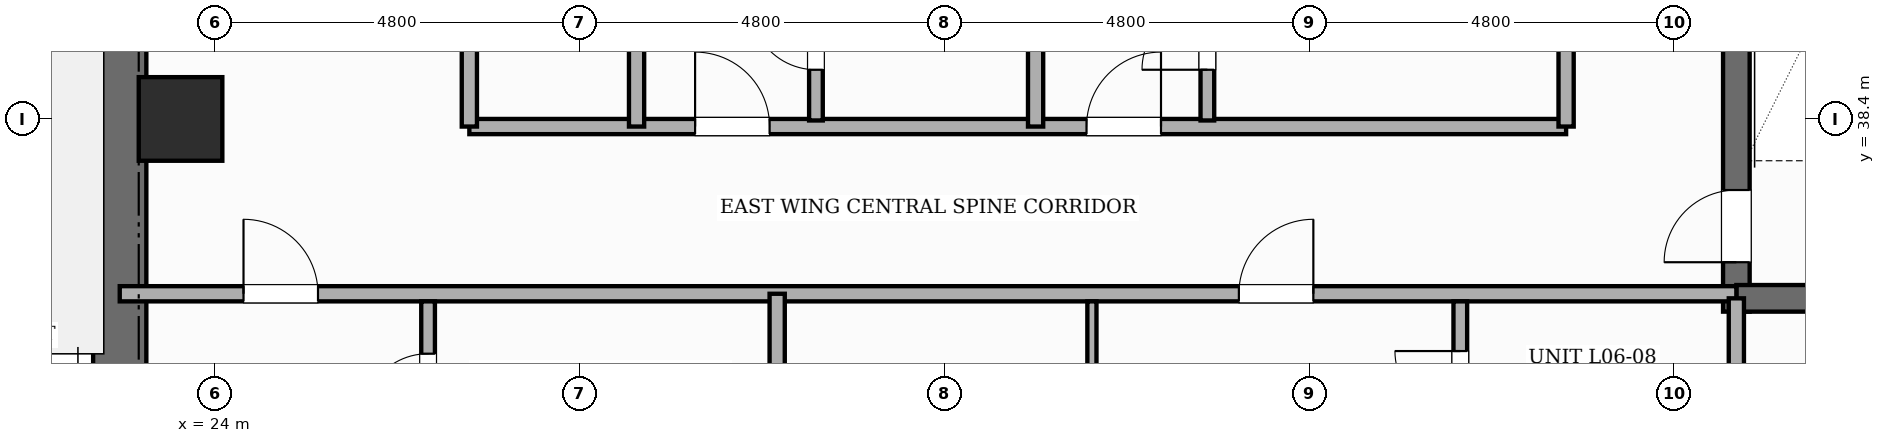
"""IFC4 building model, lengths in metres.
Left out: names, types, materials, properties, quantities, classifications, styles, units other than length and angle.
Written with IfcOpenShell. Run it as: python <this file> out.ifc"""

import sys

from ifc_helpers import new_model, si_unit, direction, frame, frame_2d, origin, origin_2d, place, context, subcontext, project, spatial, rectangle, extrude, element, fill, save


model = new_model("IFC4")
c1 = context("Model", 3, precision=1e-05, world=origin(), true_north=direction((0.0, 1.0)))
c2 = subcontext(c1, "Body", "Model", "MODEL_VIEW")
j1 = project(units=[si_unit("LENGTHUNIT", "METRE"), si_unit("PLANEANGLEUNIT", "RADIAN")], contexts=[c1])
p1 = place(None, origin())
s1 = spatial("IfcSite", under=j1, at=p1, CompositionType="ELEMENT")
p2 = place(p1, origin())
s2 = spatial("IfcBuilding", under=s1, at=p2, CompositionType="ELEMENT")
p3 = place(p2, frame((0.0, 0.0, 28.6)))
s3 = spatial("IfcBuildingStorey", under=s2, at=p3, CompositionType="ELEMENT", Elevation=28.6)
p4 = place(p3, frame((22.75, 30.55, 0.0), z_axis=(0.0, 0.0, 1.0), x_axis=(0.0, 1.0, 0.0)))
e1 = element("IfcWall", 1, at=p4, inside=s3, PredefinedType="SHEAR", context=c2, shape_type="SweptSolid", body=[
    extrude(rectangle(XDim=15.6, YDim=0.7, at=frame_2d((7.8, 0.0))), origin(), (0.0, 0.0, 1.0), 3.6),
])
p5 = place(p4, frame((10.8, 0.0, 0.0)))
e2 = element("IfcOpeningElement", 2, at=p5, cuts=e1, PredefinedType="OPENING", context=c2, shape_type="SweptSolid", body=[
    extrude(rectangle(XDim=1.0, YDim=2.15, at=frame_2d((0.5, 1.075))), frame((0.0, 0.36, 0.0), z_axis=(0.0, -1.0, 0.0), x_axis=(1.0, 0.0, 0.0)), (0.0, 0.0, 1.0), 0.72),
])
p6 = place(p3, frame((44.02, 35.865, 0.0), z_axis=(0.0, 0.0, 1.0), x_axis=(0.0, 1.0, 0.0)))
e3 = element("IfcWall", 3, at=p6, inside=s3, PredefinedType="SHEAR", context=c2, shape_type="SweptSolid", body=[
    extrude(rectangle(XDim=8.97, YDim=0.35, at=frame_2d((4.485, 0.0))), origin(), (0.0, 0.0, 1.0), 3.6),
])
p7 = place(p6, frame((0.65, 0.0, 0.0)))
e4 = element("IfcOpeningElement", 4, at=p7, cuts=e3, PredefinedType="OPENING", context=c2, shape_type="SweptSolid", body=[
    extrude(rectangle(XDim=0.95, YDim=2.1, at=frame_2d((0.475, 1.05))), frame((0.0, 0.185, 0.0), z_axis=(0.0, -1.0, 0.0), x_axis=(1.0, 0.0, 0.0)), (0.0, 0.0, 1.0), 0.37),
])
p8 = place(p3, frame((44.02, 36.04, 0.0), z_axis=(0.0, 0.0, 1.0), x_axis=(1.0, 0.0, 0.0)))
e5 = element("IfcWall", 5, at=p8, inside=s3, PredefinedType="SHEAR", context=c2, shape_type="SweptSolid", body=[
    extrude(rectangle(XDim=3.58, YDim=0.35, at=frame_2d((1.79, 0.0))), origin(), (0.0, 0.0, 1.0), 3.6),
])
p9 = place(p3, frame((23.55, 38.4, 0.0), z_axis=(0.0, 0.0, 1.0), x_axis=(1.0, 0.0, 0.0)))
e6 = element("IfcColumn", 6, at=p9, inside=s3, PredefinedType="COLUMN", context=c2, shape_type="SweptSolid", body=[
    extrude(rectangle(XDim=1.1, YDim=1.1, at=origin_2d()), origin(), (0.0, 0.0, 1.0), 3.6),
])
p10 = place(p3, frame((22.75, 36.1, 0.0), z_axis=(0.0, 0.0, 1.0), x_axis=(1.0, 0.0, 0.0)))
e7 = element("IfcWall", 7, at=p10, inside=s3, PredefinedType="PARTITIONING", context=c2, shape_type="SweptSolid", body=[
    extrude(rectangle(XDim=21.27, YDim=0.2, at=frame_2d((10.635, 0.0))), origin(), (0.0, 0.0, 1.0), 3.35),
])
p11 = place(p10, frame((1.628, 0.0, 0.0)))
e8 = element("IfcOpeningElement", 8, at=p11, cuts=e7, PredefinedType="OPENING", context=c2, shape_type="SweptSolid", body=[
    extrude(rectangle(XDim=0.98, YDim=2.18, at=frame_2d((0.49, 1.09))), frame((0.0, 0.11, 0.0), z_axis=(0.0, -1.0, 0.0), x_axis=(1.0, 0.0, 0.0)), (0.0, 0.0, 1.0), 0.22),
])
p12 = place(p10, frame((14.725, 0.0, 0.0)))
e9 = element("IfcOpeningElement", 9, at=p12, cuts=e7, PredefinedType="OPENING", context=c2, shape_type="SweptSolid", body=[
    extrude(rectangle(XDim=0.98, YDim=2.18, at=frame_2d((0.49, 1.09))), frame((0.0, 0.11, 0.0), z_axis=(0.0, -1.0, 0.0), x_axis=(1.0, 0.0, 0.0)), (0.0, 0.0, 1.0), 0.22),
])
p13 = place(p3, frame((27.35, 38.3, 0.0), z_axis=(0.0, 0.0, 1.0), x_axis=(1.0, 0.0, 0.0)))
e10 = element("IfcWall", 10, at=p13, inside=s3, PredefinedType="PARTITIONING", context=c2, shape_type="SweptSolid", body=[
    extrude(rectangle(XDim=14.43, YDim=0.2, at=frame_2d((7.215, 0.0))), origin(), (0.0, 0.0, 1.0), 3.35),
])
p14 = place(p13, frame((2.97, 0.0, 0.0)))
e11 = element("IfcOpeningElement", 11, at=p14, cuts=e10, PredefinedType="OPENING", context=c2, shape_type="SweptSolid", body=[
    extrude(rectangle(XDim=0.98, YDim=2.18, at=frame_2d((0.49, 1.09))), frame((0.0, 0.11, 0.0), z_axis=(0.0, -1.0, 0.0), x_axis=(1.0, 0.0, 0.0)), (0.0, 0.0, 1.0), 0.22),
])
p15 = place(p13, frame((8.12, 0.0, 0.0)))
e12 = element("IfcOpeningElement", 12, at=p15, cuts=e10, PredefinedType="OPENING", context=c2, shape_type="SweptSolid", body=[
    extrude(rectangle(XDim=0.98, YDim=2.18, at=frame_2d((0.49, 1.09))), frame((0.0, 0.11, 0.0), z_axis=(0.0, -1.0, 0.0), x_axis=(1.0, 0.0, 0.0)), (0.0, 0.0, 1.0), 0.22),
])
p16 = place(p3, frame((27.35, 38.3, 0.0), z_axis=(0.0, 0.0, 1.0), x_axis=(0.0, 1.0, 0.0)))
e13 = element("IfcWall", 13, at=p16, inside=s3, PredefinedType="PARTITIONING", context=c2, shape_type="SweptSolid", body=[
    extrude(rectangle(XDim=9.38, YDim=0.2, at=frame_2d((4.69, 0.0))), origin(), (0.0, 0.0, 1.0), 3.35),
])
p17 = place(p16, frame((1.2, 0.0, 0.0)))
e14 = element("IfcOpeningElement", 14, at=p17, cuts=e13, PredefinedType="OPENING", context=c2, shape_type="SweptSolid", body=[
    extrude(rectangle(XDim=0.95, YDim=2.15, at=frame_2d((0.475, 1.075))), frame((0.0, 0.11, 0.0), z_axis=(0.0, -1.0, 0.0), x_axis=(1.0, 0.0, 0.0)), (0.0, 0.0, 1.0), 0.22),
])
p18 = place(p3, frame((29.55, 38.3, 0.0), z_axis=(0.0, 0.0, 1.0), x_axis=(0.0, 1.0, 0.0)))
e15 = element("IfcWall", 15, at=p18, inside=s3, PredefinedType="SOLIDWALL", context=c2, shape_type="SweptSolid", body=[
    extrude(rectangle(XDim=9.38, YDim=0.2, at=frame_2d((4.69, 0.0))), origin(), (0.0, 0.0, 1.0), 3.35),
])
p19 = place(p3, frame((26.807, 29.12, 0.0), z_axis=(0.0, 0.0, 1.0), x_axis=(0.0, 1.0, 0.0)))
e16 = element("IfcWall", 16, at=p19, inside=s3, PredefinedType="PLUMBINGWALL", context=c2, shape_type="SweptSolid", body=[
    extrude(rectangle(XDim=6.88, YDim=0.18, at=frame_2d((3.44, 0.0))), origin(), (0.0, 0.0, 1.0), 3.35),
])
p20 = place(p19, frame((0.617, 0.0, 0.0)))
e17 = element("IfcOpeningElement", 17, at=p20, cuts=e16, PredefinedType="OPENING", context=c2, shape_type="SweptSolid", body=[
    extrude(rectangle(XDim=0.9, YDim=2.15, at=frame_2d((0.45, 1.075))), frame((0.0, 0.1, 0.0), z_axis=(0.0, -1.0, 0.0), x_axis=(1.0, 0.0, 0.0)), (0.0, 0.0, 1.0), 0.2),
])
p21 = place(p19, frame((3.21, 0.0, 0.0)))
e18 = element("IfcOpeningElement", 18, at=p21, cuts=e16, PredefinedType="OPENING", context=c2, shape_type="SweptSolid", body=[
    extrude(rectangle(XDim=0.9, YDim=2.15, at=frame_2d((0.45, 1.075))), frame((0.0, 0.1, 0.0), z_axis=(0.0, -1.0, 0.0), x_axis=(1.0, 0.0, 0.0)), (0.0, 0.0, 1.0), 0.2),
])
p22 = place(p19, frame((5.332, 0.0, 0.0)))
e19 = element("IfcOpeningElement", 19, at=p22, cuts=e16, PredefinedType="OPENING", context=c2, shape_type="SweptSolid", body=[
    extrude(rectangle(XDim=0.86, YDim=2.1, at=frame_2d((0.43, 1.05))), frame((0.0, 0.1, 0.0), z_axis=(0.0, -1.0, 0.0), x_axis=(1.0, 0.0, 0.0)), (0.0, 0.0, 1.0), 0.2),
])
p23 = place(p3, frame((31.4, 29.12, 0.0), z_axis=(0.0, 0.0, 1.0), x_axis=(0.0, 1.0, 0.0)))
e20 = element("IfcWall", 20, at=p23, inside=s3, PredefinedType="SOLIDWALL", context=c2, shape_type="SweptSolid", body=[
    extrude(rectangle(XDim=6.98, YDim=0.2, at=frame_2d((3.49, 0.0))), origin(), (0.0, 0.0, 1.0), 3.35),
])
p24 = place(p3, frame((40.388, 29.12, 0.0), z_axis=(0.0, 0.0, 1.0), x_axis=(0.0, 1.0, 0.0)))
e21 = element("IfcWall", 21, at=p24, inside=s3, PredefinedType="PLUMBINGWALL", context=c2, shape_type="SweptSolid", body=[
    extrude(rectangle(XDim=6.88, YDim=0.18, at=frame_2d((3.44, 0.0))), origin(), (0.0, 0.0, 1.0), 3.35),
])
p25 = place(p24, frame((0.679, 0.0, 0.0)))
e22 = element("IfcOpeningElement", 22, at=p25, cuts=e21, PredefinedType="OPENING", context=c2, shape_type="SweptSolid", body=[
    extrude(rectangle(XDim=0.9, YDim=2.15, at=frame_2d((0.45, 1.075))), frame((0.0, 0.1, 0.0), z_axis=(0.0, -1.0, 0.0), x_axis=(1.0, 0.0, 0.0)), (0.0, 0.0, 1.0), 0.2),
])
p26 = place(p24, frame((3.315, 0.0, 0.0)))
e23 = element("IfcOpeningElement", 23, at=p26, cuts=e21, PredefinedType="OPENING", context=c2, shape_type="SweptSolid", body=[
    extrude(rectangle(XDim=0.9, YDim=2.15, at=frame_2d((0.45, 1.075))), frame((0.0, 0.1, 0.0), z_axis=(0.0, -1.0, 0.0), x_axis=(1.0, 0.0, 0.0)), (0.0, 0.0, 1.0), 0.2),
])
p27 = place(p24, frame((5.366, 0.0, 0.0)))
e24 = element("IfcOpeningElement", 24, at=p27, cuts=e21, PredefinedType="OPENING", context=c2, shape_type="SweptSolid", body=[
    extrude(rectangle(XDim=0.86, YDim=2.1, at=frame_2d((0.43, 1.05))), frame((0.0, 0.1, 0.0), z_axis=(0.0, -1.0, 0.0), x_axis=(1.0, 0.0, 0.0)), (0.0, 0.0, 1.0), 0.2),
])
p28 = place(p3, frame((35.541, 29.12, 0.0), z_axis=(0.0, 0.0, 1.0), x_axis=(0.0, 1.0, 0.0)))
e25 = element("IfcWall", 25, at=p28, inside=s3, PredefinedType="PARTITIONING", context=c2, shape_type="SweptSolid", body=[
    extrude(rectangle(XDim=6.88, YDim=0.12, at=frame_2d((3.44, 0.0))), origin(), (0.0, 0.0, 1.0), 3.35),
])
p29 = place(p28, frame((0.679, 0.0, 0.0)))
e26 = element("IfcOpeningElement", 26, at=p29, cuts=e25, PredefinedType="OPENING", context=c2, shape_type="SweptSolid", body=[
    extrude(rectangle(XDim=0.9, YDim=2.15, at=frame_2d((0.45, 1.075))), frame((0.0, 0.07, 0.0), z_axis=(0.0, -1.0, 0.0), x_axis=(1.0, 0.0, 0.0)), (0.0, 0.0, 1.0), 0.14),
])
p30 = place(p28, frame((4.149, 0.0, 0.0)))
e27 = element("IfcOpeningElement", 27, at=p30, cuts=e25, PredefinedType="OPENING", context=c2, shape_type="SweptSolid", body=[
    extrude(rectangle(XDim=0.9, YDim=2.15, at=frame_2d((0.45, 1.075))), frame((0.0, 0.07, 0.0), z_axis=(0.0, -1.0, 0.0), x_axis=(1.0, 0.0, 0.0)), (0.0, 0.0, 1.0), 0.14),
])
p31 = place(p3, frame((31.91, 38.38, 0.0), z_axis=(0.0, 0.0, 1.0), x_axis=(0.0, 1.0, 0.0)))
e28 = element("IfcWall", 28, at=p31, inside=s3, PredefinedType="PLUMBINGWALL", context=c2, shape_type="SweptSolid", body=[
    extrude(rectangle(XDim=9.3, YDim=0.18, at=frame_2d((4.65, 0.0))), origin(), (0.0, 0.0, 1.0), 3.35),
])
p32 = place(p31, frame((0.667, 0.0, 0.0)))
e29 = element("IfcOpeningElement", 29, at=p32, cuts=e28, PredefinedType="OPENING", context=c2, shape_type="SweptSolid", body=[
    extrude(rectangle(XDim=0.86, YDim=2.1, at=frame_2d((0.43, 1.05))), frame((0.0, 0.1, 0.0), z_axis=(0.0, -1.0, 0.0), x_axis=(1.0, 0.0, 0.0)), (0.0, 0.0, 1.0), 0.2),
])
p33 = place(p31, frame((3.43, 0.0, 0.0)))
e30 = element("IfcOpeningElement", 30, at=p33, cuts=e28, PredefinedType="OPENING", context=c2, shape_type="SweptSolid", body=[
    extrude(rectangle(XDim=0.9, YDim=2.15, at=frame_2d((0.45, 1.075))), frame((0.0, 0.1, 0.0), z_axis=(0.0, -1.0, 0.0), x_axis=(1.0, 0.0, 0.0)), (0.0, 0.0, 1.0), 0.2),
])
p34 = place(p31, frame((6.828, 0.0, 0.0)))
e31 = element("IfcOpeningElement", 31, at=p34, cuts=e28, PredefinedType="OPENING", context=c2, shape_type="SweptSolid", body=[
    extrude(rectangle(XDim=0.9, YDim=2.15, at=frame_2d((0.45, 1.075))), frame((0.0, 0.1, 0.0), z_axis=(0.0, -1.0, 0.0), x_axis=(1.0, 0.0, 0.0)), (0.0, 0.0, 1.0), 0.2),
])
p35 = place(p3, frame((34.8, 38.3, 0.0), z_axis=(0.0, 0.0, 1.0), x_axis=(0.0, 1.0, 0.0)))
e32 = element("IfcWall", 32, at=p35, inside=s3, PredefinedType="SOLIDWALL", context=c2, shape_type="SweptSolid", body=[
    extrude(rectangle(XDim=9.38, YDim=0.2, at=frame_2d((4.69, 0.0))), origin(), (0.0, 0.0, 1.0), 3.35),
])
p36 = place(p3, frame((37.06, 38.38, 0.0), z_axis=(0.0, 0.0, 1.0), x_axis=(0.0, 1.0, 0.0)))
e33 = element("IfcWall", 33, at=p36, inside=s3, PredefinedType="PLUMBINGWALL", context=c2, shape_type="SweptSolid", body=[
    extrude(rectangle(XDim=9.3, YDim=0.18, at=frame_2d((4.65, 0.0))), origin(), (0.0, 0.0, 1.0), 3.35),
])
p37 = place(p36, frame((0.667, 0.0, 0.0)))
e34 = element("IfcOpeningElement", 34, at=p37, cuts=e33, PredefinedType="OPENING", context=c2, shape_type="SweptSolid", body=[
    extrude(rectangle(XDim=0.86, YDim=2.1, at=frame_2d((0.43, 1.05))), frame((0.0, 0.1, 0.0), z_axis=(0.0, -1.0, 0.0), x_axis=(1.0, 0.0, 0.0)), (0.0, 0.0, 1.0), 0.2),
])
p38 = place(p36, frame((3.43, 0.0, 0.0)))
e35 = element("IfcOpeningElement", 35, at=p38, cuts=e33, PredefinedType="OPENING", context=c2, shape_type="SweptSolid", body=[
    extrude(rectangle(XDim=0.9, YDim=2.15, at=frame_2d((0.45, 1.075))), frame((0.0, 0.1, 0.0), z_axis=(0.0, -1.0, 0.0), x_axis=(1.0, 0.0, 0.0)), (0.0, 0.0, 1.0), 0.2),
])
p39 = place(p36, frame((6.828, 0.0, 0.0)))
e36 = element("IfcOpeningElement", 36, at=p39, cuts=e33, PredefinedType="OPENING", context=c2, shape_type="SweptSolid", body=[
    extrude(rectangle(XDim=0.9, YDim=2.15, at=frame_2d((0.45, 1.075))), frame((0.0, 0.1, 0.0), z_axis=(0.0, -1.0, 0.0), x_axis=(1.0, 0.0, 0.0)), (0.0, 0.0, 1.0), 0.2),
])
p40 = place(p3, frame((41.78, 38.3, 0.0), z_axis=(0.0, 0.0, 1.0), x_axis=(0.0, 1.0, 0.0)))
e37 = element("IfcWall", 37, at=p40, inside=s3, PredefinedType="PARTITIONING", context=c2, shape_type="SweptSolid", body=[
    extrude(rectangle(XDim=9.38, YDim=0.2, at=frame_2d((4.69, 0.0))), origin(), (0.0, 0.0, 1.0), 3.35),
])
p41 = place(p3, frame((44.02, 29.12, 0.0), z_axis=(0.0, 0.0, 1.0), x_axis=(0.0, 1.0, 0.0)))
e38 = element("IfcWall", 38, at=p41, inside=s3, PredefinedType="SOLIDWALL", context=c2, shape_type="SweptSolid", body=[
    extrude(rectangle(XDim=6.92, YDim=0.2, at=frame_2d((3.46, 0.0))), origin(), (0.0, 0.0, 1.0), 3.35),
])
p42 = place(p7, origin())
e39 = element("IfcDoor", 39, at=p42, inside=s3, OperationType="SINGLE_SWING_LEFT", PredefinedType="DOOR", context=c2, shape_type="SweptSolid", body=[
    extrude(rectangle(XDim=0.95, YDim=2.1, at=frame_2d((0.475, 1.05))), frame((0.0, 0.025, 0.0), z_axis=(0.0, -1.0, 0.0), x_axis=(1.0, 0.0, 0.0)), (0.0, 0.0, 1.0), 0.05),
])
fill(e4, e39)
p43 = place(p11, origin())
e40 = element("IfcDoor", 40, at=p43, inside=s3, OperationType="SINGLE_SWING_LEFT", PredefinedType="DOOR", context=c2, shape_type="SweptSolid", body=[
    extrude(rectangle(XDim=0.98, YDim=2.18, at=frame_2d((0.49, 1.09))), frame((0.0, 0.025, 0.0), z_axis=(0.0, -1.0, 0.0), x_axis=(1.0, 0.0, 0.0)), (0.0, 0.0, 1.0), 0.05),
])
fill(e8, e40)
p44 = place(p22, origin())
e41 = element("IfcDoor", 41, at=p44, inside=s3, OperationType="SINGLE_SWING_LEFT", PredefinedType="DOOR", context=c2, shape_type="SweptSolid", body=[
    extrude(rectangle(XDim=0.86, YDim=2.1, at=frame_2d((0.43, 1.05))), frame((0.0, 0.025, 0.0), z_axis=(0.0, -1.0, 0.0), x_axis=(1.0, 0.0, 0.0)), (0.0, 0.0, 1.0), 0.05),
])
fill(e19, e41)
p45 = place(p12, origin())
e42 = element("IfcDoor", 42, at=p45, inside=s3, OperationType="SINGLE_SWING_RIGHT", PredefinedType="DOOR", context=c2, shape_type="SweptSolid", body=[
    extrude(rectangle(XDim=0.98, YDim=2.18, at=frame_2d((0.49, 1.09))), frame((0.0, 0.025, 0.0), z_axis=(0.0, -1.0, 0.0), x_axis=(1.0, 0.0, 0.0)), (0.0, 0.0, 1.0), 0.05),
])
fill(e9, e42)
p46 = place(p27, origin())
e43 = element("IfcDoor", 43, at=p46, inside=s3, OperationType="SINGLE_SWING_RIGHT", PredefinedType="DOOR", context=c2, shape_type="SweptSolid", body=[
    extrude(rectangle(XDim=0.86, YDim=2.1, at=frame_2d((0.43, 1.05))), frame((0.0, 0.025, 0.0), z_axis=(0.0, -1.0, 0.0), x_axis=(1.0, 0.0, 0.0)), (0.0, 0.0, 1.0), 0.05),
])
fill(e24, e43)
p47 = place(p14, origin())
e44 = element("IfcDoor", 44, at=p47, inside=s3, OperationType="SINGLE_SWING_LEFT", PredefinedType="DOOR", context=c2, shape_type="SweptSolid", body=[
    extrude(rectangle(XDim=0.98, YDim=2.18, at=frame_2d((0.49, 1.09))), frame((0.0, 0.025, 0.0), z_axis=(0.0, -1.0, 0.0), x_axis=(1.0, 0.0, 0.0)), (0.0, 0.0, 1.0), 0.05),
])
fill(e11, e44)
p48 = place(p32, origin())
e45 = element("IfcDoor", 45, at=p48, inside=s3, OperationType="SINGLE_SWING_RIGHT", PredefinedType="DOOR", context=c2, shape_type="SweptSolid", body=[
    extrude(rectangle(XDim=0.86, YDim=2.1, at=frame_2d((0.43, 1.05))), frame((0.0, 0.025, 0.0), z_axis=(0.0, -1.0, 0.0), x_axis=(1.0, 0.0, 0.0)), (0.0, 0.0, 1.0), 0.05),
])
fill(e29, e45)
p49 = place(p15, origin())
e46 = element("IfcDoor", 46, at=p49, inside=s3, OperationType="SINGLE_SWING_RIGHT", PredefinedType="DOOR", context=c2, shape_type="SweptSolid", body=[
    extrude(rectangle(XDim=0.98, YDim=2.18, at=frame_2d((0.49, 1.09))), frame((0.0, 0.025, 0.0), z_axis=(0.0, -1.0, 0.0), x_axis=(1.0, 0.0, 0.0)), (0.0, 0.0, 1.0), 0.05),
])
fill(e12, e46)
p50 = place(p37, origin())
e47 = element("IfcDoor", 47, at=p50, inside=s3, OperationType="SINGLE_SWING_LEFT", PredefinedType="DOOR", context=c2, shape_type="SweptSolid", body=[
    extrude(rectangle(XDim=0.86, YDim=2.1, at=frame_2d((0.43, 1.05))), frame((0.0, 0.025, 0.0), z_axis=(0.0, -1.0, 0.0), x_axis=(1.0, 0.0, 0.0)), (0.0, 0.0, 1.0), 0.05),
])
fill(e34, e47)
save(model, sys.argv[1])
